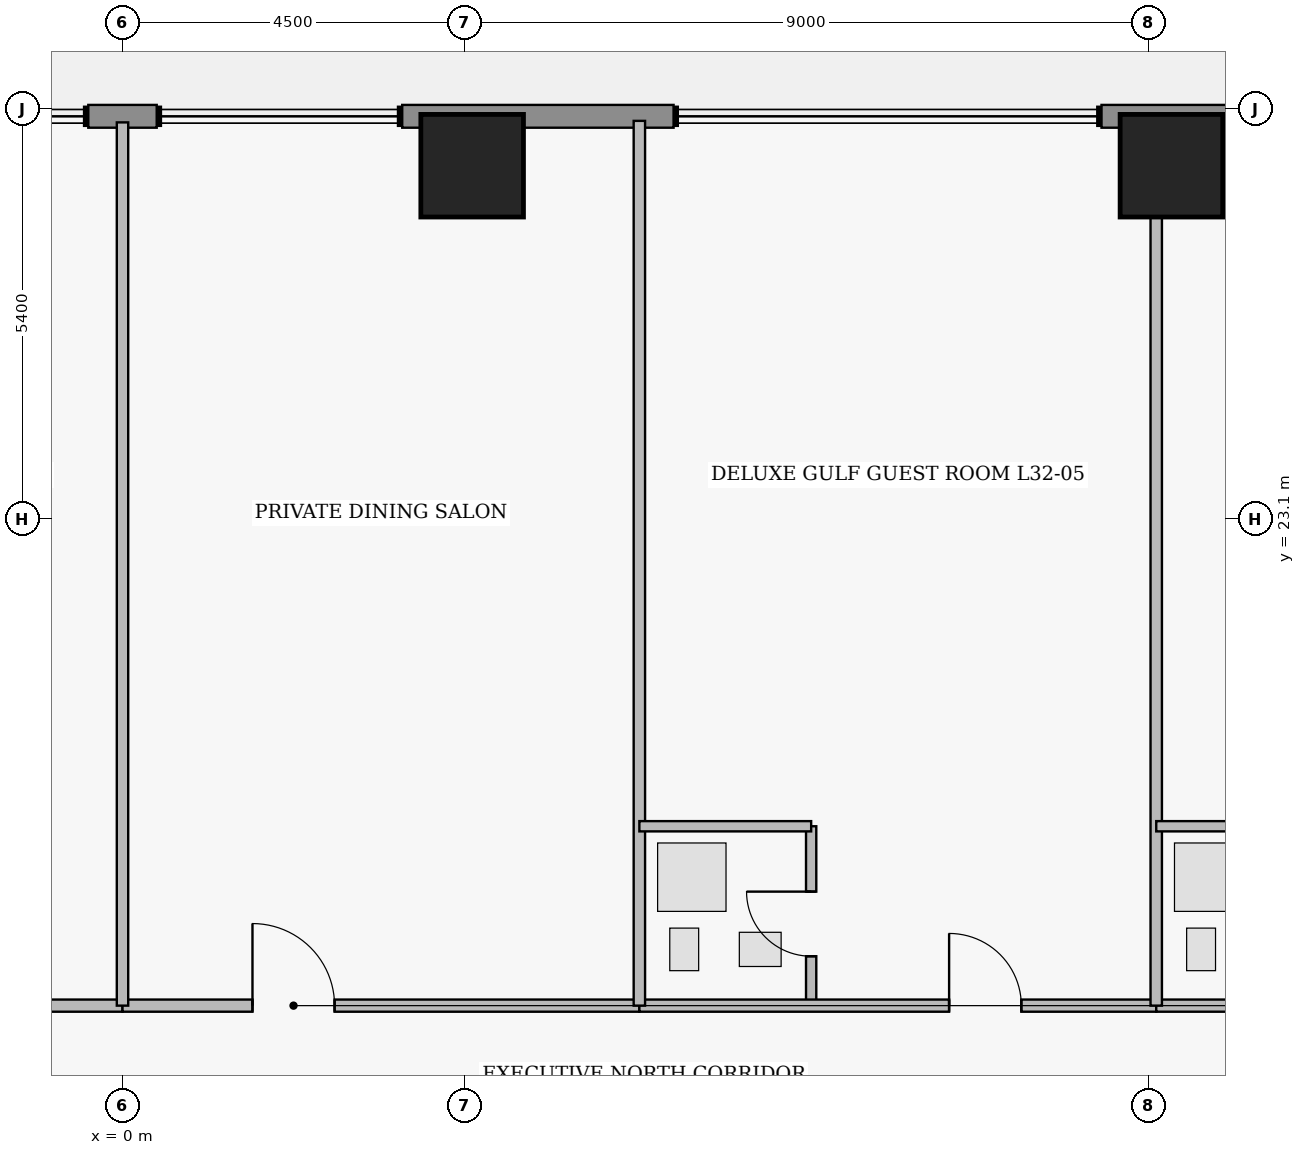
"""IFC4 building model, lengths in metres.
Left out: names, types, materials, properties, quantities, classifications, styles, units other than length and angle.
Written with IfcOpenShell. Run it as: python <this file> out.ifc"""

import sys

from ifc_helpers import new_model, si_unit, direction, frame, frame_2d, origin, origin_2d, place, context, subcontext, project, spatial, rectangle, extrude, element, fill, save


model = new_model("IFC4")
c1 = context("Model", 3, precision=1e-05, world=origin(), true_north=direction((0.0, 1.0)))
c2 = subcontext(c1, "Body", "Model", "MODEL_VIEW")
j1 = project(units=[si_unit("LENGTHUNIT", "METRE"), si_unit("PLANEANGLEUNIT", "RADIAN")], contexts=[c1])
p1 = place(None, origin())
s1 = spatial("IfcSite", under=j1, at=p1, CompositionType="ELEMENT")
p2 = place(p1, origin())
s2 = spatial("IfcBuilding", under=s1, at=p2, CompositionType="ELEMENT")
p3 = place(p2, frame((0.0, 0.0, 128.5)))
s3 = spatial("IfcBuildingStorey", under=s2, at=p3, CompositionType="ELEMENT", Elevation=128.5)
for number, where, z_axis, x_axis in (
    (1, (4.6, 27.75, 0.0), (0.0, 0.0, 1.0), (1.0, 0.0, 0.0)),
    (2, (13.8, 27.75, 0.0), (0.0, 0.0, 1.0), (1.0, 0.0, 0.0)),
):
    element("IfcColumn", number, at=place(p3, frame(where, z_axis=z_axis, x_axis=x_axis)), inside=s3, PredefinedType="COLUMN", context=c2, shape_type="SweptSolid", body=[
        extrude(rectangle(XDim=1.35, YDim=1.35, at=origin_2d()), origin(), (0.0, 0.0, 1.0), 3.65),
    ])
p4 = place(p3, frame((-0.45, 28.4, 0.0), z_axis=(0.0, 0.0, 1.0), x_axis=(1.0, 0.0, 0.0)))
e3 = element("IfcWall", 3, at=p4, inside=s3, PredefinedType="STANDARD", context=c2, shape_type="SweptSolid", body=[
    extrude(rectangle(XDim=0.9, YDim=0.3, at=frame_2d((0.45, 0.0))), origin(), (0.0, 0.0, 1.0), 3.43),
])
p5 = place(p3, frame((3.68, 28.4, 0.0), z_axis=(0.0, 0.0, 1.0), x_axis=(1.0, 0.0, 0.0)))
e4 = element("IfcWall", 4, at=p5, inside=s3, PredefinedType="STANDARD", context=c2, shape_type="SweptSolid", body=[
    extrude(rectangle(XDim=3.57, YDim=0.3, at=frame_2d((1.785, 0.0))), origin(), (0.0, 0.0, 1.0), 3.43),
])
p6 = place(p3, frame((12.88, 28.4, 0.0), z_axis=(0.0, 0.0, 1.0), x_axis=(1.0, 0.0, 0.0)))
e5 = element("IfcWall", 5, at=p6, inside=s3, PredefinedType="STANDARD", context=c2, shape_type="SweptSolid", body=[
    extrude(rectangle(XDim=1.84, YDim=0.3, at=frame_2d((0.92, 0.0))), origin(), (0.0, 0.0, 1.0), 3.43),
])
p7 = place(p3, frame((-6.8, 16.7, 0.0), z_axis=(0.0, 0.0, 1.0), x_axis=(1.0, 0.0, 0.0)))
e6 = element("IfcWall", 6, at=p7, inside=s3, PredefinedType="PARTITIONING", context=c2, shape_type="SweptSolid", body=[
    extrude(rectangle(XDim=6.8, YDim=0.16, at=frame_2d((3.4, 0.0))), origin(), (0.0, 0.0, 1.0), 2.973),
])
p8 = place(p7, frame((4.075, 0.0, 0.0)))
e7 = element("IfcOpeningElement", 7, at=p8, cuts=e6, PredefinedType="OPENING", context=c2, shape_type="SweptSolid", body=[
    extrude(rectangle(XDim=0.95, YDim=2.15, at=frame_2d((0.475, 1.075))), frame((0.0, 0.09, 0.0), z_axis=(0.0, -1.0, 0.0), x_axis=(1.0, 0.0, 0.0)), (0.0, 0.0, 1.0), 0.18),
])
p9 = place(p3, frame((0.0, 16.7, 0.0), z_axis=(0.0, 0.0, 1.0), x_axis=(1.0, 0.0, 0.0)))
e8 = element("IfcWall", 8, at=p9, inside=s3, PredefinedType="PARTITIONING", context=c2, shape_type="SweptSolid", body=[
    extrude(rectangle(XDim=6.8, YDim=0.16, at=frame_2d((3.4, 0.0))), origin(), (0.0, 0.0, 1.0), 2.973),
])
p10 = place(p9, frame((1.71, 0.0, 0.0)))
e9 = element("IfcOpeningElement", 9, at=p10, cuts=e8, PredefinedType="OPENING", context=c2, shape_type="SweptSolid", body=[
    extrude(rectangle(XDim=1.08, YDim=2.18, at=frame_2d((0.54, 1.09))), frame((0.0, 0.09, 0.0), z_axis=(0.0, -1.0, 0.0), x_axis=(1.0, 0.0, 0.0)), (0.0, 0.0, 1.0), 0.18),
])
p11 = place(p3, frame((9.06, 16.7, 0.0), z_axis=(0.0, 0.0, 1.0), x_axis=(0.0, 1.0, 0.0)))
e10 = element("IfcWall", 10, at=p11, inside=s3, PredefinedType="PLUMBINGWALL", context=c2, shape_type="SweptSolid", body=[
    extrude(rectangle(XDim=2.36, YDim=0.135, at=frame_2d((1.18, 0.0))), origin(), (0.0, 0.0, 1.0), 3.43),
])
p12 = place(p11, frame((0.65, 0.0, 0.0)))
e11 = element("IfcOpeningElement", 11, at=p12, cuts=e10, PredefinedType="OPENING", context=c2, shape_type="SweptSolid", body=[
    extrude(rectangle(XDim=0.85, YDim=2.1, at=frame_2d((0.425, 1.05))), frame((0.0, 0.077, 0.0), z_axis=(0.0, -1.0, 0.0), x_axis=(1.0, 0.0, 0.0)), (0.0, 0.0, 1.0), 0.155),
])
p13 = place(p3, frame((6.8, 16.7, 0.0), z_axis=(0.0, 0.0, 1.0), x_axis=(1.0, 0.0, 0.0)))
e12 = element("IfcWall", 12, at=p13, inside=s3, PredefinedType="PARTITIONING", context=c2, shape_type="SweptSolid", body=[
    extrude(rectangle(XDim=6.8, YDim=0.16, at=frame_2d((3.4, 0.0))), origin(), (0.0, 0.0, 1.0), 2.973),
])
p14 = place(p13, frame((4.075, 0.0, 0.0)))
e13 = element("IfcOpeningElement", 13, at=p14, cuts=e12, PredefinedType="OPENING", context=c2, shape_type="SweptSolid", body=[
    extrude(rectangle(XDim=0.95, YDim=2.15, at=frame_2d((0.475, 1.075))), frame((0.0, 0.09, 0.0), z_axis=(0.0, -1.0, 0.0), x_axis=(1.0, 0.0, 0.0)), (0.0, 0.0, 1.0), 0.18),
])
p15 = place(p3, frame((13.6, 16.7, 0.0), z_axis=(0.0, 0.0, 1.0), x_axis=(1.0, 0.0, 0.0)))
e14 = element("IfcWall", 14, at=p15, inside=s3, PredefinedType="PARTITIONING", context=c2, shape_type="SweptSolid", body=[
    extrude(rectangle(XDim=7.0, YDim=0.16, at=frame_2d((3.5, 0.0))), origin(), (0.0, 0.0, 1.0), 3.43),
])
p16 = place(p15, frame((4.025, 0.0, 0.0)))
e15 = element("IfcOpeningElement", 15, at=p16, cuts=e14, PredefinedType="OPENING", context=c2, shape_type="SweptSolid", body=[
    extrude(rectangle(XDim=1.0, YDim=2.15, at=frame_2d((0.5, 1.075))), frame((0.0, 0.09, 0.0), z_axis=(0.0, -1.0, 0.0), x_axis=(1.0, 0.0, 0.0)), (0.0, 0.0, 1.0), 0.18),
])
p17 = place(p3, frame((0.0, 16.7, 0.0), z_axis=(0.0, 0.0, 1.0), x_axis=(0.0, 1.0, 0.0)))
e16 = element("IfcWall", 16, at=p17, inside=s3, PredefinedType="PARTITIONING", context=c2, shape_type="SweptSolid", body=[
    extrude(rectangle(XDim=11.62, YDim=0.15, at=frame_2d((5.81, 0.0))), origin(), (0.0, 0.0, 1.0), 3.43),
])
p18 = place(p3, frame((6.8, 16.7, 0.0), z_axis=(0.0, 0.0, 1.0), x_axis=(0.0, 1.0, 0.0)))
e17 = element("IfcWall", 17, at=p18, inside=s3, PredefinedType="PARTITIONING", context=c2, shape_type="SweptSolid", body=[
    extrude(rectangle(XDim=11.64, YDim=0.15, at=frame_2d((5.82, 0.0))), origin(), (0.0, 0.0, 1.0), 3.43),
])
p19 = place(p3, frame((6.8, 19.06, 0.0), z_axis=(0.0, 0.0, 1.0), x_axis=(1.0, 0.0, 0.0)))
e18 = element("IfcWall", 18, at=p19, inside=s3, PredefinedType="PLUMBINGWALL", context=c2, shape_type="SweptSolid", body=[
    extrude(rectangle(XDim=2.26, YDim=0.135, at=frame_2d((1.13, 0.0))), origin(), (0.0, 0.0, 1.0), 2.973),
])
p20 = place(p3, frame((13.6, 16.7, 0.0), z_axis=(0.0, 0.0, 1.0), x_axis=(0.0, 1.0, 0.0)))
e19 = element("IfcWall", 19, at=p20, inside=s3, PredefinedType="PARTITIONING", context=c2, shape_type="SweptSolid", body=[
    extrude(rectangle(XDim=11.62, YDim=0.15, at=frame_2d((5.81, 0.0))), origin(), (0.0, 0.0, 1.0), 2.503),
])
p21 = place(p3, frame((13.6, 19.06, 0.0), z_axis=(0.0, 0.0, 1.0), x_axis=(1.0, 0.0, 0.0)))
e20 = element("IfcWall", 20, at=p21, inside=s3, PredefinedType="PLUMBINGWALL", context=c2, shape_type="SweptSolid", body=[
    extrude(rectangle(XDim=2.26, YDim=0.135, at=frame_2d((1.13, 0.0))), origin(), (0.0, 0.0, 1.0), 3.43),
])
p22 = place(p10, origin())
e21 = element("IfcDoor", 21, at=p22, inside=s3, OperationType="SINGLE_SWING_LEFT", PredefinedType="DOOR", context=c2, shape_type="SweptSolid", body=[
    extrude(rectangle(XDim=1.08, YDim=2.18, at=frame_2d((0.54, 1.09))), frame((0.0, 0.025, 0.0), z_axis=(0.0, -1.0, 0.0), x_axis=(1.0, 0.0, 0.0)), (0.0, 0.0, 1.0), 0.05),
])
fill(e9, e21)
p23 = place(p12, origin())
e22 = element("IfcDoor", 22, at=p23, inside=s3, OperationType="SINGLE_SWING_RIGHT", PredefinedType="DOOR", context=c2, shape_type="SweptSolid", body=[
    extrude(rectangle(XDim=0.85, YDim=2.1, at=frame_2d((0.425, 1.05))), frame((0.0, 0.025, 0.0), z_axis=(0.0, -1.0, 0.0), x_axis=(1.0, 0.0, 0.0)), (0.0, 0.0, 1.0), 0.05),
])
fill(e11, e22)
p24 = place(p14, origin())
e23 = element("IfcDoor", 23, at=p24, inside=s3, OperationType="SINGLE_SWING_LEFT", PredefinedType="DOOR", context=c2, shape_type="SweptSolid", body=[
    extrude(rectangle(XDim=0.95, YDim=2.15, at=frame_2d((0.475, 1.075))), frame((0.0, 0.025, 0.0), z_axis=(0.0, -1.0, 0.0), x_axis=(1.0, 0.0, 0.0)), (0.0, 0.0, 1.0), 0.05),
])
fill(e13, e23)
save(model, sys.argv[1])
